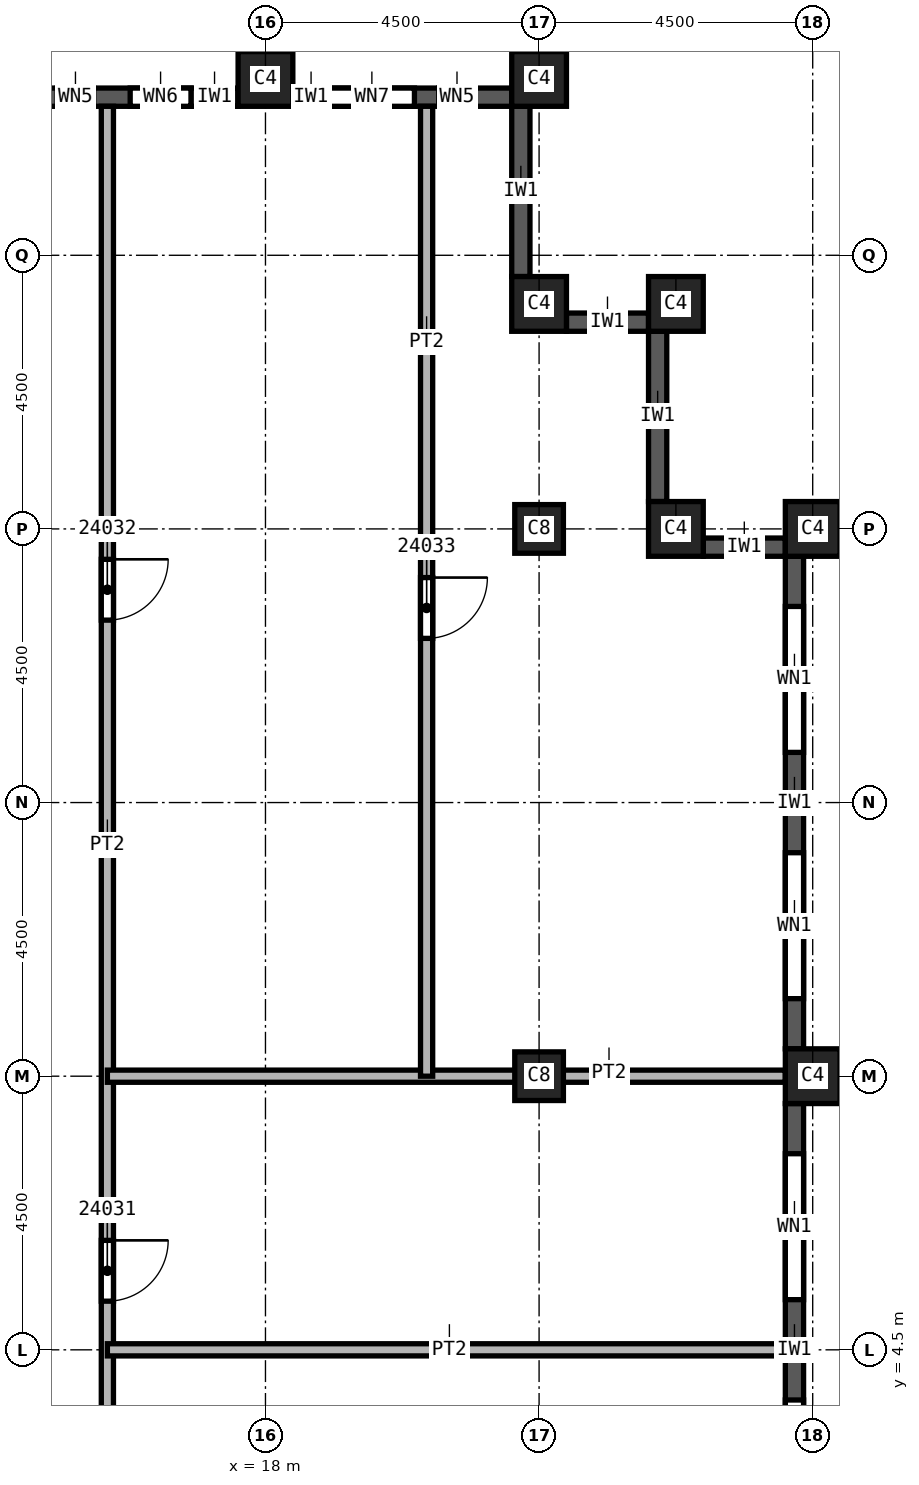
"""IFC4 building model, lengths in metres.
Left out: names, types, materials, properties, quantities, classifications, styles, units other than length and angle.
Written with IfcOpenShell. Run it as: python <this file> out.ifc"""

import sys

from ifc_helpers import new_model, si_unit, direction, frame, frame_2d, origin, origin_2d, place, context, subcontext, project, spatial, rectangle, extrude, element, fill, save


model = new_model("IFC4")
c1 = context("Model", 3, precision=1e-05, world=origin(), true_north=direction((0.0, 1.0)))
c2 = subcontext(c1, "Body", "Model", "MODEL_VIEW")
j1 = project(units=[si_unit("LENGTHUNIT", "METRE"), si_unit("PLANEANGLEUNIT", "RADIAN")], contexts=[c1])
p1 = place(None, origin())
s1 = spatial("IfcSite", under=j1, at=p1, CompositionType="ELEMENT")
p2 = place(p1, origin())
s2 = spatial("IfcBuilding", under=s1, at=p2, CompositionType="ELEMENT")
p3 = place(p2, frame((0.0, 0.0, 342.0)))
s3 = spatial("IfcBuildingStorey", under=s2, at=p3, CompositionType="ELEMENT", Elevation=342.0)
for number, where, z_axis, x_axis in (
    (1, (22.5, 9.0, 0.0), (0.0, 0.0, 1.0), (1.0, 0.0, 0.0)),
    (2, (22.5, 18.0, 0.0), (0.0, 0.0, 1.0), (1.0, 0.0, 0.0)),
):
    element("IfcColumn", number, at=place(p3, frame(where, z_axis=z_axis, x_axis=x_axis)), inside=s3, PredefinedType="COLUMN", context=c2, shape_type="SweptSolid", body=[
        extrude(rectangle(XDim=0.8, YDim=0.8, at=origin_2d()), origin(), (0.0, 0.0, 1.0), 3.74),
    ])
for number, where, z_axis, x_axis in (
    (3, (27.0, 9.0, 0.0), (0.0, 0.0, 1.0), (0.0, 1.0, 0.0)),
    (4, (27.0, 18.0, 0.0), (0.0, 0.0, 1.0), (0.0, 1.0, 0.0)),
    (5, (18.0, 25.4, 0.0), (0.0, 0.0, 1.0), (1.0, 0.0, 0.0)),
    (6, (22.5, 25.4, 0.0), (0.0, 0.0, 1.0), (1.0, 0.0, 0.0)),
    (7, (22.5, 21.7, 0.0), (0.0, 0.0, 1.0), (1.0, 0.0, 0.0)),
    (8, (24.75, 21.7, 0.0), (0.0, 0.0, 1.0), (1.0, 0.0, 0.0)),
    (9, (24.75, 18.0, 0.0), (0.0, 0.0, 1.0), (1.0, 0.0, 0.0)),
):
    element("IfcColumn", number, at=place(p3, frame(where, z_axis=z_axis, x_axis=x_axis)), inside=s3, PredefinedType="COLUMN", context=c2, shape_type="SweptSolid", body=[
        extrude(rectangle(XDim=0.9, YDim=0.9, at=origin_2d()), origin(), (0.0, 0.0, 1.0), 3.74),
    ])
p4 = place(p3, frame((26.7, 0.45, 0.0), z_axis=(0.0, 0.0, 1.0), x_axis=(0.0, 1.0, 0.0)))
e10 = element("IfcWall", 10, at=p4, inside=s3, PredefinedType="SOLIDWALL", context=c2, shape_type="SweptSolid", body=[
    extrude(rectangle(XDim=8.1, YDim=0.3, at=frame_2d((4.05, 0.0))), origin(), (0.0, 0.0, 1.0), 3.14),
])
p5 = place(p4, frame((0.825, 0.0, 0.8)))
e11 = element("IfcOpeningElement", 11, at=p5, cuts=e10, PredefinedType="OPENING", context=c2, shape_type="SweptSolid", body=[
    extrude(rectangle(XDim=2.4, YDim=1.95, at=frame_2d((1.2, 0.975))), frame((0.0, 0.15, 0.0), z_axis=(0.0, -1.0, 0.0), x_axis=(1.0, 0.0, 0.0)), (0.0, 0.0, 1.0), 0.3),
])
p6 = place(p4, frame((4.875, 0.0, 0.8)))
e12 = element("IfcOpeningElement", 12, at=p6, cuts=e10, PredefinedType="OPENING", context=c2, shape_type="SweptSolid", body=[
    extrude(rectangle(XDim=2.4, YDim=1.95, at=frame_2d((1.2, 0.975))), frame((0.0, 0.15, 0.0), z_axis=(0.0, -1.0, 0.0), x_axis=(1.0, 0.0, 0.0)), (0.0, 0.0, 1.0), 0.3),
])
p7 = place(p3, frame((26.7, 9.45, 0.0), z_axis=(0.0, 0.0, 1.0), x_axis=(0.0, 1.0, 0.0)))
e13 = element("IfcWall", 13, at=p7, inside=s3, PredefinedType="SOLIDWALL", context=c2, shape_type="SweptSolid", body=[
    extrude(rectangle(XDim=8.1, YDim=0.3, at=frame_2d((4.05, 0.0))), origin(), (0.0, 0.0, 1.0), 3.14),
])
p8 = place(p7, frame((0.825, 0.0, 0.8)))
e14 = element("IfcOpeningElement", 14, at=p8, cuts=e13, PredefinedType="OPENING", context=c2, shape_type="SweptSolid", body=[
    extrude(rectangle(XDim=2.4, YDim=1.95, at=frame_2d((1.2, 0.975))), frame((0.0, 0.15, 0.0), z_axis=(0.0, -1.0, 0.0), x_axis=(1.0, 0.0, 0.0)), (0.0, 0.0, 1.0), 0.3),
])
p9 = place(p7, frame((4.875, 0.0, 0.8)))
e15 = element("IfcOpeningElement", 15, at=p9, cuts=e13, PredefinedType="OPENING", context=c2, shape_type="SweptSolid", body=[
    extrude(rectangle(XDim=2.4, YDim=1.95, at=frame_2d((1.2, 0.975))), frame((0.0, 0.15, 0.0), z_axis=(0.0, -1.0, 0.0), x_axis=(1.0, 0.0, 0.0)), (0.0, 0.0, 1.0), 0.3),
])
p10 = place(p3, frame((26.55, 17.7, 0.0), z_axis=(0.0, 0.0, 1.0), x_axis=(-1.0, 0.0, 0.0)))
e16 = element("IfcWall", 16, at=p10, inside=s3, PredefinedType="SOLIDWALL", context=c2, shape_type="SweptSolid", body=[
    extrude(rectangle(XDim=1.35, YDim=0.3, at=frame_2d((0.675, 0.0))), origin(), (0.0, 0.0, 1.0), 3.14),
])
p11 = place(p3, frame((24.45, 18.45, 0.0), z_axis=(0.0, 0.0, 1.0), x_axis=(0.0, 1.0, 0.0)))
e17 = element("IfcWall", 17, at=p11, inside=s3, PredefinedType="SOLIDWALL", context=c2, shape_type="SweptSolid", body=[
    extrude(rectangle(XDim=2.8, YDim=0.3, at=frame_2d((1.4, 0.0))), origin(), (0.0, 0.0, 1.0), 3.14),
])
p12 = place(p3, frame((24.3, 21.4, 0.0), z_axis=(0.0, 0.0, 1.0), x_axis=(-1.0, 0.0, 0.0)))
e18 = element("IfcWall", 18, at=p12, inside=s3, PredefinedType="SOLIDWALL", context=c2, shape_type="SweptSolid", body=[
    extrude(rectangle(XDim=1.35, YDim=0.3, at=frame_2d((0.675, 0.0))), origin(), (0.0, 0.0, 1.0), 3.14),
])
p13 = place(p3, frame((22.2, 22.15, 0.0), z_axis=(0.0, 0.0, 1.0), x_axis=(0.0, 1.0, 0.0)))
e19 = element("IfcWall", 19, at=p13, inside=s3, PredefinedType="SOLIDWALL", context=c2, shape_type="SweptSolid", body=[
    extrude(rectangle(XDim=2.8, YDim=0.3, at=frame_2d((1.4, 0.0))), origin(), (0.0, 0.0, 1.0), 3.14),
])
p14 = place(p3, frame((22.05, 25.1, 0.0), z_axis=(0.0, 0.0, 1.0), x_axis=(-1.0, 0.0, 0.0)))
e20 = element("IfcWall", 20, at=p14, inside=s3, PredefinedType="SOLIDWALL", context=c2, shape_type="SweptSolid", body=[
    extrude(rectangle(XDim=3.6, YDim=0.3, at=frame_2d((1.8, 0.0))), origin(), (0.0, 0.0, 1.0), 3.14),
])
p15 = place(p14, frame((0.6, 0.0, 0.8)))
e21 = element("IfcOpeningElement", 21, at=p15, cuts=e20, PredefinedType="OPENING", context=c2, shape_type="SweptSolid", body=[
    extrude(rectangle(XDim=0.6, YDim=1.95, at=frame_2d((0.3, 0.975))), frame((0.0, 0.15, 0.0), z_axis=(0.0, -1.0, 0.0), x_axis=(1.0, 0.0, 0.0)), (0.0, 0.0, 1.0), 0.3),
])
p16 = place(p14, frame((1.6, 0.0, 0.8)))
e22 = element("IfcOpeningElement", 22, at=p16, cuts=e20, PredefinedType="OPENING", context=c2, shape_type="SweptSolid", body=[
    extrude(rectangle(XDim=1.4, YDim=1.95, at=frame_2d((0.7, 0.975))), frame((0.0, 0.15, 0.0), z_axis=(0.0, -1.0, 0.0), x_axis=(1.0, 0.0, 0.0)), (0.0, 0.0, 1.0), 0.3),
])
p17 = place(p3, frame((17.55, 25.1, 0.0), z_axis=(0.0, 0.0, 1.0), x_axis=(-1.0, 0.0, 0.0)))
e23 = element("IfcWall", 23, at=p17, inside=s3, PredefinedType="SOLIDWALL", context=c2, shape_type="SweptSolid", body=[
    extrude(rectangle(XDim=3.6, YDim=0.3, at=frame_2d((1.8, 0.0))), origin(), (0.0, 0.0, 1.0), 3.14),
])
p18 = place(p17, frame((0.775, 0.0, 0.8)))
e24 = element("IfcOpeningElement", 24, at=p18, cuts=e23, PredefinedType="OPENING", context=c2, shape_type="SweptSolid", body=[
    extrude(rectangle(XDim=1.0, YDim=1.95, at=frame_2d((0.5, 0.975))), frame((0.0, 0.15, 0.0), z_axis=(0.0, -1.0, 0.0), x_axis=(1.0, 0.0, 0.0)), (0.0, 0.0, 1.0), 0.3),
])
p19 = place(p17, frame((2.375, 0.0, 0.8)))
e25 = element("IfcOpeningElement", 25, at=p19, cuts=e23, PredefinedType="OPENING", context=c2, shape_type="SweptSolid", body=[
    extrude(rectangle(XDim=0.6, YDim=1.95, at=frame_2d((0.3, 0.975))), frame((0.0, 0.15, 0.0), z_axis=(0.0, -1.0, 0.0), x_axis=(1.0, 0.0, 0.0)), (0.0, 0.0, 1.0), 0.3),
])
p20 = place(p3, frame((15.4, 24.95, 0.0), z_axis=(0.0, 0.0, 1.0), x_axis=(0.0, -1.0, 0.0)))
e26 = element("IfcWall", 26, at=p20, inside=s3, PredefinedType="PARTITIONING", context=c2, shape_type="SweptSolid", body=[
    extrude(rectangle(XDim=49.9, YDim=0.2, at=frame_2d((24.95, 0.0))), origin(), (0.0, 0.0, 1.0), 3.74),
])
p21 = place(p20, frame((23.75, 0.0, 0.0)))
e27 = element("IfcOpeningElement", 27, at=p21, cuts=e26, PredefinedType="OPENING", context=c2, shape_type="SweptSolid", body=[
    extrude(rectangle(XDim=1.0, YDim=2.1, at=frame_2d((0.5, 1.05))), frame((0.0, 0.1, 0.0), z_axis=(0.0, -1.0, 0.0), x_axis=(1.0, 0.0, 0.0)), (0.0, 0.0, 1.0), 0.2),
])
p22 = place(p20, frame((18.65, 0.0, 0.0)))
e28 = element("IfcOpeningElement", 28, at=p22, cuts=e26, PredefinedType="OPENING", context=c2, shape_type="SweptSolid", body=[
    extrude(rectangle(XDim=1.0, YDim=2.1, at=frame_2d((0.5, 1.05))), frame((0.0, 0.1, 0.0), z_axis=(0.0, -1.0, 0.0), x_axis=(1.0, 0.0, 0.0)), (0.0, 0.0, 1.0), 0.2),
])
p23 = place(p20, frame((7.45, 0.0, 0.0)))
e29 = element("IfcOpeningElement", 29, at=p23, cuts=e26, PredefinedType="OPENING", context=c2, shape_type="SweptSolid", body=[
    extrude(rectangle(XDim=1.0, YDim=2.1, at=frame_2d((0.5, 1.05))), frame((0.0, 0.1, 0.0), z_axis=(0.0, -1.0, 0.0), x_axis=(1.0, 0.0, 0.0)), (0.0, 0.0, 1.0), 0.2),
])
p24 = place(p20, frame((44.15, 0.0, 0.0)))
e30 = element("IfcOpeningElement", 30, at=p24, cuts=e26, PredefinedType="OPENING", context=c2, shape_type="SweptSolid", body=[
    extrude(rectangle(XDim=1.0, YDim=2.1, at=frame_2d((0.5, 1.05))), frame((0.0, 0.1, 0.0), z_axis=(0.0, -1.0, 0.0), x_axis=(1.0, 0.0, 0.0)), (0.0, 0.0, 1.0), 0.2),
])
p25 = place(p20, frame((38.6, 0.0, 0.0)))
e31 = element("IfcOpeningElement", 31, at=p25, cuts=e26, PredefinedType="OPENING", context=c2, shape_type="SweptSolid", body=[
    extrude(rectangle(XDim=1.0, YDim=2.1, at=frame_2d((0.5, 1.05))), frame((0.0, 0.1, 0.0), z_axis=(0.0, -1.0, 0.0), x_axis=(1.0, 0.0, 0.0)), (0.0, 0.0, 1.0), 0.2),
])
p26 = place(p20, frame((37.25, 0.0, 0.0)))
e32 = element("IfcOpeningElement", 32, at=p26, cuts=e26, PredefinedType="OPENING", context=c2, shape_type="SweptSolid", body=[
    extrude(rectangle(XDim=1.0, YDim=2.1, at=frame_2d((0.5, 1.05))), frame((0.0, 0.1, 0.0), z_axis=(0.0, -1.0, 0.0), x_axis=(1.0, 0.0, 0.0)), (0.0, 0.0, 1.0), 0.2),
])
p27 = place(p20, frame((32.75, 0.0, 0.0)))
e33 = element("IfcOpeningElement", 33, at=p27, cuts=e26, PredefinedType="OPENING", context=c2, shape_type="SweptSolid", body=[
    extrude(rectangle(XDim=1.0, YDim=2.1, at=frame_2d((0.5, 1.05))), frame((0.0, 0.1, 0.0), z_axis=(0.0, -1.0, 0.0), x_axis=(1.0, 0.0, 0.0)), (0.0, 0.0, 1.0), 0.2),
])
p28 = place(p20, frame((27.65, 0.0, 0.0)))
e34 = element("IfcOpeningElement", 34, at=p28, cuts=e26, PredefinedType="OPENING", context=c2, shape_type="SweptSolid", body=[
    extrude(rectangle(XDim=1.0, YDim=2.1, at=frame_2d((0.5, 1.05))), frame((0.0, 0.1, 0.0), z_axis=(0.0, -1.0, 0.0), x_axis=(1.0, 0.0, 0.0)), (0.0, 0.0, 1.0), 0.2),
])
for number, where, z_axis, x_axis in (
    (35, (15.4, 4.5, 0.0), (0.0, 0.0, 1.0), (1.0, 0.0, 0.0)),
    (36, (15.4, 9.0, 0.0), (0.0, 0.0, 1.0), (1.0, 0.0, 0.0)),
):
    element("IfcWall", number, at=place(p3, frame(where, z_axis=z_axis, x_axis=x_axis)), inside=s3, PredefinedType="PARTITIONING", context=c2, shape_type="SweptSolid", body=[
        extrude(rectangle(XDim=11.15, YDim=0.2, at=frame_2d((5.575, 0.0))), origin(), (0.0, 0.0, 1.0), 3.74),
    ])
p29 = place(p3, frame((20.65, 24.95, 0.0), z_axis=(0.0, 0.0, 1.0), x_axis=(0.0, -1.0, 0.0)))
e37 = element("IfcWall", 37, at=p29, inside=s3, PredefinedType="PARTITIONING", context=c2, shape_type="SweptSolid", body=[
    extrude(rectangle(XDim=15.95, YDim=0.2, at=frame_2d((7.975, 0.0))), origin(), (0.0, 0.0, 1.0), 3.74),
])
p30 = place(p29, frame((7.75, 0.0, 0.0)))
e38 = element("IfcOpeningElement", 38, at=p30, cuts=e37, PredefinedType="OPENING", context=c2, shape_type="SweptSolid", body=[
    extrude(rectangle(XDim=1.0, YDim=2.1, at=frame_2d((0.5, 1.05))), frame((0.0, 0.1, 0.0), z_axis=(0.0, -1.0, 0.0), x_axis=(1.0, 0.0, 0.0)), (0.0, 0.0, 1.0), 0.2),
])
p31 = place(p5, origin())
e39 = element("IfcWindow", 39, at=p31, inside=s3, PartitioningType="SINGLE_PANEL", PredefinedType="WINDOW", context=c2, shape_type="SweptSolid", body=[
    extrude(rectangle(XDim=2.4, YDim=1.95, at=frame_2d((1.2, 0.975))), frame((0.0, 0.03, 0.0), z_axis=(0.0, -1.0, 0.0), x_axis=(1.0, 0.0, 0.0)), (0.0, 0.0, 1.0), 0.06),
])
fill(e11, e39)
p32 = place(p6, origin())
e40 = element("IfcWindow", 40, at=p32, inside=s3, PartitioningType="SINGLE_PANEL", PredefinedType="WINDOW", context=c2, shape_type="SweptSolid", body=[
    extrude(rectangle(XDim=2.4, YDim=1.95, at=frame_2d((1.2, 0.975))), frame((0.0, 0.03, 0.0), z_axis=(0.0, -1.0, 0.0), x_axis=(1.0, 0.0, 0.0)), (0.0, 0.0, 1.0), 0.06),
])
fill(e12, e40)
p33 = place(p8, origin())
e41 = element("IfcWindow", 41, at=p33, inside=s3, PartitioningType="SINGLE_PANEL", PredefinedType="WINDOW", context=c2, shape_type="SweptSolid", body=[
    extrude(rectangle(XDim=2.4, YDim=1.95, at=frame_2d((1.2, 0.975))), frame((0.0, 0.03, 0.0), z_axis=(0.0, -1.0, 0.0), x_axis=(1.0, 0.0, 0.0)), (0.0, 0.0, 1.0), 0.06),
])
fill(e14, e41)
p34 = place(p9, origin())
e42 = element("IfcWindow", 42, at=p34, inside=s3, PartitioningType="SINGLE_PANEL", PredefinedType="WINDOW", context=c2, shape_type="SweptSolid", body=[
    extrude(rectangle(XDim=2.4, YDim=1.95, at=frame_2d((1.2, 0.975))), frame((0.0, 0.03, 0.0), z_axis=(0.0, -1.0, 0.0), x_axis=(1.0, 0.0, 0.0)), (0.0, 0.0, 1.0), 0.06),
])
fill(e15, e42)
p35 = place(p22, origin())
e43 = element("IfcDoor", 43, at=p35, inside=s3, OperationType="SINGLE_SWING_RIGHT", PredefinedType="DOOR", context=c2, shape_type="SweptSolid", body=[
    extrude(rectangle(XDim=1.0, YDim=2.1, at=frame_2d((0.5, 1.05))), frame((0.0, 0.025, 0.0), z_axis=(0.0, -1.0, 0.0), x_axis=(1.0, 0.0, 0.0)), (0.0, 0.0, 1.0), 0.05),
])
fill(e28, e43)
p36 = place(p23, origin())
e44 = element("IfcDoor", 44, at=p36, inside=s3, OperationType="SINGLE_SWING_LEFT", PredefinedType="DOOR", context=c2, shape_type="SweptSolid", body=[
    extrude(rectangle(XDim=1.0, YDim=2.1, at=frame_2d((0.5, 1.05))), frame((0.0, 0.025, 0.0), z_axis=(0.0, -1.0, 0.0), x_axis=(1.0, 0.0, 0.0)), (0.0, 0.0, 1.0), 0.05),
])
fill(e29, e44)
p37 = place(p30, origin())
e45 = element("IfcDoor", 45, at=p37, inside=s3, OperationType="SINGLE_SWING_RIGHT", PredefinedType="DOOR", context=c2, shape_type="SweptSolid", body=[
    extrude(rectangle(XDim=1.0, YDim=2.1, at=frame_2d((0.5, 1.05))), frame((0.0, 0.025, 0.0), z_axis=(0.0, -1.0, 0.0), x_axis=(1.0, 0.0, 0.0)), (0.0, 0.0, 1.0), 0.05),
])
fill(e38, e45)
p38 = place(p15, origin())
e46 = element("IfcWindow", 46, at=p38, inside=s3, PartitioningType="SINGLE_PANEL", PredefinedType="WINDOW", context=c2, shape_type="SweptSolid", body=[
    extrude(rectangle(XDim=0.6, YDim=1.95, at=frame_2d((0.3, 0.975))), frame((0.0, 0.03, 0.0), z_axis=(0.0, -1.0, 0.0), x_axis=(1.0, 0.0, 0.0)), (0.0, 0.0, 1.0), 0.06),
])
fill(e21, e46)
p39 = place(p16, origin())
e47 = element("IfcWindow", 47, at=p39, inside=s3, PartitioningType="SINGLE_PANEL", PredefinedType="WINDOW", context=c2, shape_type="SweptSolid", body=[
    extrude(rectangle(XDim=1.4, YDim=1.95, at=frame_2d((0.7, 0.975))), frame((0.0, 0.03, 0.0), z_axis=(0.0, -1.0, 0.0), x_axis=(1.0, 0.0, 0.0)), (0.0, 0.0, 1.0), 0.06),
])
fill(e22, e47)
p40 = place(p18, origin())
e48 = element("IfcWindow", 48, at=p40, inside=s3, PartitioningType="SINGLE_PANEL", PredefinedType="WINDOW", context=c2, shape_type="SweptSolid", body=[
    extrude(rectangle(XDim=1.0, YDim=1.95, at=frame_2d((0.5, 0.975))), frame((0.0, 0.03, 0.0), z_axis=(0.0, -1.0, 0.0), x_axis=(1.0, 0.0, 0.0)), (0.0, 0.0, 1.0), 0.06),
])
fill(e24, e48)
p41 = place(p19, origin())
e49 = element("IfcWindow", 49, at=p41, inside=s3, PartitioningType="SINGLE_PANEL", PredefinedType="WINDOW", context=c2, shape_type="SweptSolid", body=[
    extrude(rectangle(XDim=0.6, YDim=1.95, at=frame_2d((0.3, 0.975))), frame((0.0, 0.03, 0.0), z_axis=(0.0, -1.0, 0.0), x_axis=(1.0, 0.0, 0.0)), (0.0, 0.0, 1.0), 0.06),
])
fill(e25, e49)
save(model, sys.argv[1])
